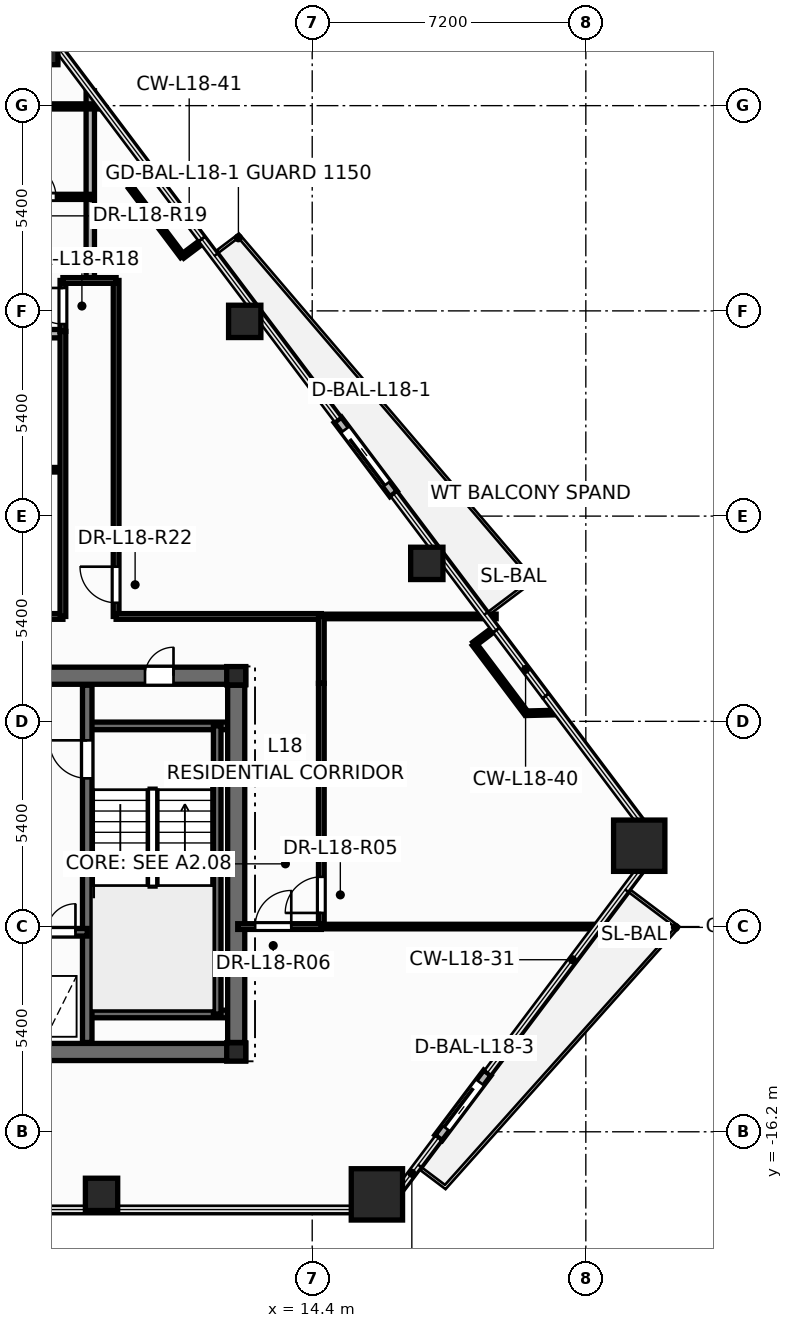
"""IFC4 building model, lengths in metres.
Left out: names, types, materials, properties, quantities, classifications, styles, units other than length and angle.
Written with IfcOpenShell. Run it as: python <this file> out.ifc"""

import sys

from ifc_helpers import new_model, si_unit, direction, frame, frame_2d, origin, origin_2d, place, context, subcontext, project, spatial, rectangle, hollow_rectangle, hollow_circle, i_section, extrude, element, fill, save


model = new_model("IFC4")
c1 = context("Model", 3, precision=1e-05, world=origin(), true_north=direction((0.0, 1.0)))
c2 = subcontext(c1, "Body", "Model", "MODEL_VIEW")
j1 = project(units=[si_unit("LENGTHUNIT", "METRE"), si_unit("PLANEANGLEUNIT", "RADIAN")], contexts=[c1])
p1 = place(None, origin())
s1 = spatial("IfcSite", under=j1, at=p1, CompositionType="ELEMENT")
p2 = place(p1, origin())
s2 = spatial("IfcBuilding", under=s1, at=p2, CompositionType="ELEMENT")
p3 = place(p2, frame((0.0, 0.0, 72.0)))
s3 = spatial("IfcBuildingStorey", under=s2, at=p3, CompositionType="ELEMENT", Elevation=72.0)
for number, where, z_axis, x_axis in (
    (1, (16.103, -17.847, 0.0), (0.0, 0.0, 1.0), (1.0, 0.0, 0.0)),
    (2, (23.005, -8.673, 0.0), (0.0, 0.0, 1.0), (1.0, 0.0, 0.0)),
    (3, (7.034, 12.553, 0.0), (0.0, 0.0, 1.0), (1.0, 0.0, 0.0)),
):
    element("IfcColumn", number, at=place(p3, frame(where, z_axis=z_axis, x_axis=x_axis)), inside=s3, PredefinedType="COLUMN", context=c2, shape_type="SweptSolid", body=[
        extrude(hollow_rectangle(XDim=1.35, YDim=1.35, WallThickness=0.065, at=origin_2d()), origin(), (0.0, 0.0, 1.0), 3.6),
    ])
for number, where, z_axis, x_axis in (
    (4, (8.856, -17.847, 0.0), (0.0, 0.0, 1.0), (1.0, 0.0, 0.0)),
    (5, (17.416, -1.244, 0.0), (0.0, 0.0, 1.0), (1.0, 0.0, 0.0)),
    (6, (12.624, 5.124, 0.0), (0.0, 0.0, 1.0), (1.0, 0.0, 0.0)),
):
    element("IfcColumn", number, at=place(p3, frame(where, z_axis=z_axis, x_axis=x_axis)), inside=s3, PredefinedType="COLUMN", context=c2, shape_type="SweptSolid", body=[
        extrude(hollow_circle(Radius=0.425, WallThickness=0.038, at=origin_2d()), origin(), (0.0, 0.0, 1.0), 3.6),
    ])
for number, where, z_axis, x_axis in (
    (7, (12.4, -14.1, 0.0), (0.0, 0.0, 1.0), (1.0, 0.0, 0.0)),
    (8, (12.4, -4.2, 0.0), (0.0, 0.0, 1.0), (1.0, 0.0, 0.0)),
):
    element("IfcColumn", number, at=place(p3, frame(where, z_axis=z_axis, x_axis=x_axis)), inside=s3, PredefinedType="COLUMN", context=c2, shape_type="SweptSolid", body=[
        extrude(i_section(OverallWidth=0.5, OverallDepth=0.482, WebThickness=0.04, FlangeThickness=0.045, at=origin_2d()), origin(), (0.0, 0.0, 1.0), 3.6),
    ])
p4 = place(p3, frame((16.542, 0.583, -0.015), z_axis=(0.0, 0.0, 1.0), x_axis=(-0.601247991813, 0.799062483377, 0.0)))
e9 = element("IfcWall", 9, at=p4, inside=s3, PredefinedType="STANDARD", context=c2, shape_type="SweptSolid", body=[
    extrude(rectangle(XDim=2.44, YDim=0.24, at=frame_2d((1.22, 0.0))), origin(), (0.0, 0.0, 1.0), 2.728),
])
p5 = place(p4, frame((0.32, 0.0, 0.015)))
e10 = element("IfcOpeningElement", 10, at=p5, cuts=e9, PredefinedType="OPENING", context=c2, shape_type="SweptSolid", body=[
    extrude(rectangle(XDim=1.806, YDim=2.204, at=frame_2d((0.9, 1.102))), frame((0.0, 0.13, 0.0), z_axis=(0.0, -1.0, 0.0), x_axis=(1.0, 0.0, 0.0)), (0.0, 0.0, 1.0), 0.26),
])
p6 = place(p3, frame((17.723, -16.358, -0.015), z_axis=(0.0, 0.0, 1.0), x_axis=(0.601240548581, 0.799068083921, 0.0)))
e11 = element("IfcWall", 11, at=p6, inside=s3, PredefinedType="STANDARD", context=c2, shape_type="SweptSolid", body=[
    extrude(rectangle(XDim=2.14, YDim=0.24, at=frame_2d((1.07, 0.0))), origin(), (0.0, 0.0, 1.0), 2.728),
])
p7 = place(p6, frame((0.32, 0.0, 0.015)))
e12 = element("IfcOpeningElement", 12, at=p7, cuts=e11, PredefinedType="OPENING", context=c2, shape_type="SweptSolid", body=[
    extrude(rectangle(XDim=1.506, YDim=2.204, at=frame_2d((0.75, 1.102))), frame((0.0, 0.13, 0.0), z_axis=(0.0, -1.0, 0.0), x_axis=(1.0, 0.0, 0.0)), (0.0, 0.0, 1.0), 0.26),
])
p8 = place(p3, frame((-12.65, -14.1, 0.0), z_axis=(0.0, 0.0, 1.0), x_axis=(1.0, 0.0, 0.0)))
e13 = element("IfcWall", 13, at=p8, inside=s3, PredefinedType="SHEAR", context=c2, shape_type="SweptSolid", body=[
    extrude(rectangle(XDim=25.3, YDim=0.45, at=frame_2d((12.65, 0.0))), origin(), (0.0, 0.0, 1.0), 3.6),
])
p9 = place(p3, frame((-12.65, -4.2, 0.0), z_axis=(0.0, 0.0, 1.0), x_axis=(1.0, 0.0, 0.0)))
e14 = element("IfcWall", 14, at=p9, inside=s3, PredefinedType="SHEAR", context=c2, shape_type="SweptSolid", body=[
    extrude(rectangle(XDim=25.3, YDim=0.45, at=frame_2d((12.65, 0.0))), origin(), (0.0, 0.0, 1.0), 3.6),
])
p10 = place(p9, frame((1.85, 0.0, 0.0)))
e15 = element("IfcOpeningElement", 15, at=p10, cuts=e14, PredefinedType="OPENING", context=c2, shape_type="SweptSolid", body=[
    extrude(rectangle(XDim=0.756, YDim=2.054, at=frame_2d((0.375, 1.027))), frame((0.0, 0.235, 0.0), z_axis=(0.0, -1.0, 0.0), x_axis=(1.0, 0.0, 0.0)), (0.0, 0.0, 1.0), 0.47),
])
p11 = place(p9, frame((22.65, 0.0, 0.0)))
e16 = element("IfcOpeningElement", 16, at=p11, cuts=e14, PredefinedType="OPENING", context=c2, shape_type="SweptSolid", body=[
    extrude(rectangle(XDim=0.756, YDim=2.054, at=frame_2d((0.375, 1.027))), frame((0.0, 0.235, 0.0), z_axis=(0.0, -1.0, 0.0), x_axis=(1.0, 0.0, 0.0)), (0.0, 0.0, 1.0), 0.47),
])
p12 = place(p9, frame((5.85, 0.0, 0.0)))
e17 = element("IfcOpeningElement", 17, at=p12, cuts=e14, PredefinedType="OPENING", context=c2, shape_type="SweptSolid", body=[
    extrude(rectangle(XDim=1.006, YDim=2.104, at=frame_2d((0.5, 1.052))), frame((0.0, 0.235, 0.0), z_axis=(0.0, -1.0, 0.0), x_axis=(1.0, 0.0, 0.0)), (0.0, 0.0, 1.0), 0.47),
])
p13 = place(p9, frame((10.35, 0.0, 0.0)))
e18 = element("IfcOpeningElement", 18, at=p13, cuts=e14, PredefinedType="OPENING", context=c2, shape_type="SweptSolid", body=[
    extrude(rectangle(XDim=1.406, YDim=2.154, at=frame_2d((0.7, 1.077))), frame((0.0, 0.235, 0.0), z_axis=(0.0, -1.0, 0.0), x_axis=(1.0, 0.0, 0.0)), (0.0, 0.0, 1.0), 0.47),
])
p14 = place(p9, frame((18.45, 0.0, 0.0)))
e19 = element("IfcOpeningElement", 19, at=p14, cuts=e14, PredefinedType="OPENING", context=c2, shape_type="SweptSolid", body=[
    extrude(rectangle(XDim=1.006, YDim=2.104, at=frame_2d((0.5, 1.052))), frame((0.0, 0.235, 0.0), z_axis=(0.0, -1.0, 0.0), x_axis=(1.0, 0.0, 0.0)), (0.0, 0.0, 1.0), 0.47),
])
for number, where, z_axis, x_axis in (
    (20, (8.48, -5.52, 0.0), (0.0, 0.0, 1.0), (1.0, 0.0, 0.0)),
    (21, (8.48, -13.1, 0.0), (0.0, 0.0, 1.0), (1.0, 0.0, 0.0)),
):
    element("IfcWall", number, at=place(p3, frame(where, z_axis=z_axis, x_axis=x_axis)), inside=s3, PredefinedType="SOLIDWALL", context=c2, shape_type="SweptSolid", body=[
        extrude(rectangle(XDim=3.87, YDim=0.2, at=frame_2d((1.935, 0.0))), origin(), (0.0, 0.0, 1.0), 3.6),
    ])
p15 = place(p3, frame((11.9, -13.1, 0.0), z_axis=(0.0, 0.0, 1.0), x_axis=(0.0, 1.0, 0.0)))
e22 = element("IfcWall", 22, at=p15, inside=s3, PredefinedType="SOLIDWALL", context=c2, shape_type="SweptSolid", body=[
    extrude(rectangle(XDim=7.58, YDim=0.2, at=frame_2d((3.79, 0.0))), origin(), (0.0, 0.0, 1.0), 3.6),
])
p16 = place(p3, frame((8.48, -13.85, 0.0), z_axis=(0.0, 0.0, 1.0), x_axis=(0.0, 1.0, 0.0)))
e23 = element("IfcWall", 23, at=p16, inside=s3, PredefinedType="SHEAR", context=c2, shape_type="SweptSolid", body=[
    extrude(rectangle(XDim=9.4, YDim=0.25, at=frame_2d((4.7, 0.0))), origin(), (0.0, 0.0, 1.0), 3.6),
])
p17 = place(p16, frame((6.95, 0.0, 0.0)))
e24 = element("IfcOpeningElement", 24, at=p17, cuts=e23, PredefinedType="OPENING", context=c2, shape_type="SweptSolid", body=[
    extrude(rectangle(XDim=1.006, YDim=2.104, at=frame_2d((0.5, 1.052))), frame((0.0, 0.135, 0.0), z_axis=(0.0, -1.0, 0.0), x_axis=(1.0, 0.0, 0.0)), (0.0, 0.0, 1.0), 0.27),
])
p18 = place(p3, frame((5.12, -10.95, 0.0), z_axis=(0.0, 0.0, 1.0), x_axis=(1.0, 0.0, 0.0)))
e25 = element("IfcWall", 25, at=p18, inside=s3, PredefinedType="SOLIDWALL", context=c2, shape_type="SweptSolid", body=[
    extrude(rectangle(XDim=3.36, YDim=0.2, at=frame_2d((1.68, 0.0))), origin(), (0.0, 0.0, 1.0), 3.6),
])
p19 = place(p18, frame((0.42, 0.0, 0.0)))
e26 = element("IfcOpeningElement", 26, at=p19, cuts=e25, PredefinedType="OPENING", context=c2, shape_type="SweptSolid", body=[
    extrude(rectangle(XDim=1.106, YDim=2.104, at=frame_2d((0.55, 1.052))), frame((0.0, 0.11, 0.0), z_axis=(0.0, -1.0, 0.0), x_axis=(1.0, 0.0, 0.0)), (0.0, 0.0, 1.0), 0.22),
])
p20 = place(p18, frame((2.3, 0.0, 0.0)))
e27 = element("IfcOpeningElement", 27, at=p20, cuts=e25, PredefinedType="OPENING", context=c2, shape_type="SweptSolid", body=[
    extrude(rectangle(XDim=0.756, YDim=2.054, at=frame_2d((0.375, 1.027))), frame((0.0, 0.11, 0.0), z_axis=(0.0, -1.0, 0.0), x_axis=(1.0, 0.0, 0.0)), (0.0, 0.0, 1.0), 0.22),
])
p21 = place(p3, frame((12.4, -13.85, 0.0), z_axis=(0.0, 0.0, 1.0), x_axis=(0.0, 1.0, 0.0)))
e28 = element("IfcWall", 28, at=p21, inside=s3, PredefinedType="SHEAR", context=c2, shape_type="SweptSolid", body=[
    extrude(rectangle(XDim=9.4, YDim=0.45, at=frame_2d((4.7, 0.0))), origin(), (0.0, 0.0, 1.0), 3.6),
])
p22 = place(p3, frame((-5.32, -2.64, 0.0), z_axis=(0.0, 0.0, 1.0), x_axis=(1.0, 0.0, 0.0)))
e29 = element("IfcWall", 29, at=p22, inside=s3, PredefinedType="PARTITIONING", context=c2, shape_type="SweptSolid", body=[
    extrude(rectangle(XDim=13.16, YDim=0.15, at=frame_2d((6.58, 0.0))), origin(), (0.0, 0.0, 1.0), 2.325),
])
p23 = place(p22, frame((0.439, 0.0, 0.0)))
e30 = element("IfcOpeningElement", 30, at=p23, cuts=e29, PredefinedType="OPENING", context=c2, shape_type="SweptSolid", body=[
    extrude(rectangle(XDim=0.956, YDim=2.104, at=frame_2d((0.475, 1.052))), frame((0.0, 0.085, 0.0), z_axis=(0.0, -1.0, 0.0), x_axis=(1.0, 0.0, 0.0)), (0.0, 0.0, 1.0), 0.17),
])
p24 = place(p3, frame((9.24, -2.64, 0.0), z_axis=(0.0, 0.0, 1.0), x_axis=(0.0, 1.0, 0.0)))
e31 = element("IfcWall", 31, at=p24, inside=s3, PredefinedType="PARTITIONING", context=c2, shape_type="SweptSolid", body=[
    extrude(rectangle(XDim=8.84, YDim=0.15, at=frame_2d((4.42, 0.0))), origin(), (0.0, 0.0, 1.0), 2.509),
])
p25 = place(p24, frame((0.359, 0.0, 0.0)))
e32 = element("IfcOpeningElement", 32, at=p25, cuts=e31, PredefinedType="OPENING", context=c2, shape_type="SweptSolid", body=[
    extrude(rectangle(XDim=0.956, YDim=2.104, at=frame_2d((0.475, 1.052))), frame((0.0, 0.085, 0.0), z_axis=(0.0, -1.0, 0.0), x_axis=(1.0, 0.0, 0.0)), (0.0, 0.0, 1.0), 0.17),
])
p26 = place(p3, frame((14.64, -10.8, 0.0), z_axis=(0.0, 0.0, 1.0), x_axis=(1.0, 0.0, 0.0)))
e33 = element("IfcWall", 33, at=p26, inside=s3, PredefinedType="PARTITIONING", context=c2, shape_type="SweptSolid", body=[
    extrude(rectangle(XDim=7.265, YDim=0.12, at=frame_2d((3.633, 0.0))), origin(), (0.0, 0.0, 1.0), 2.713),
])
p27 = place(p3, frame((0.84, 1.22, 0.0), z_axis=(0.0, 0.0, 1.0), x_axis=(1.0, 0.0, 0.0)))
e34 = element("IfcWall", 34, at=p27, inside=s3, PredefinedType="PARTITIONING", context=c2, shape_type="SweptSolid", body=[
    extrude(rectangle(XDim=7.0, YDim=0.12, at=frame_2d((3.5, 0.0))), origin(), (0.0, 0.0, 1.0), 2.325),
])
p28 = place(p27, frame((0.875, 0.0, 0.0)))
e35 = element("IfcOpeningElement", 35, at=p28, cuts=e34, PredefinedType="OPENING", context=c2, shape_type="SweptSolid", body=[
    extrude(rectangle(XDim=0.926, YDim=2.104, at=frame_2d((0.46, 1.052))), frame((0.0, 0.07, 0.0), z_axis=(0.0, -1.0, 0.0), x_axis=(1.0, 0.0, 0.0)), (0.0, 0.0, 1.0), 0.14),
])
p29 = place(p3, frame((0.9, 4.8, 0.0), z_axis=(0.0, 0.0, 1.0), x_axis=(1.0, 0.0, 0.0)))
e36 = element("IfcWall", 36, at=p29, inside=s3, PredefinedType="PARTITIONING", context=c2, shape_type="SweptSolid", body=[
    extrude(rectangle(XDim=6.94, YDim=0.22, at=frame_2d((3.47, 0.0))), origin(), (0.0, 0.0, 1.0), 2.509),
])
p30 = place(p3, frame((14.64, -10.8, 0.0), z_axis=(0.0, 0.0, 1.0), x_axis=(0.0, 1.0, 0.0)))
e37 = element("IfcWall", 37, at=p30, inside=s3, PredefinedType="PARTITIONING", context=c2, shape_type="SweptSolid", body=[
    extrude(rectangle(XDim=6.4, YDim=0.15, at=frame_2d((3.2, 0.0))), origin(), (0.0, 0.0, 1.0), 2.325),
])
p31 = place(p30, frame((0.359, 0.0, 0.0)))
e38 = element("IfcOpeningElement", 38, at=p31, cuts=e37, PredefinedType="OPENING", context=c2, shape_type="SweptSolid", body=[
    extrude(rectangle(XDim=0.956, YDim=2.104, at=frame_2d((0.475, 1.052))), frame((0.0, 0.085, 0.0), z_axis=(0.0, -1.0, 0.0), x_axis=(1.0, 0.0, 0.0)), (0.0, 0.0, 1.0), 0.17),
])
p32 = place(p3, frame((9.24, -2.64, 0.0), z_axis=(0.0, 0.0, 1.0), x_axis=(1.0, 0.0, 0.0)))
e39 = element("IfcWall", 39, at=p32, inside=s3, PredefinedType="PARTITIONING", context=c2, shape_type="SweptSolid", body=[
    extrude(rectangle(XDim=5.4, YDim=0.15, at=frame_2d((2.7, 0.0))), origin(), (0.0, 0.0, 1.0), 3.35),
])
p33 = place(p3, frame((14.64, -2.64, 0.0), z_axis=(0.0, 0.0, 1.0), x_axis=(1.0, 0.0, 0.0)))
e40 = element("IfcWall", 40, at=p33, inside=s3, PredefinedType="PARTITIONING", context=c2, shape_type="SweptSolid", body=[
    extrude(rectangle(XDim=4.6, YDim=0.12, at=frame_2d((2.3, 0.0))), origin(), (0.0, 0.0, 1.0), 2.713),
])
p34 = place(p3, frame((7.84, -2.64, 0.0), z_axis=(0.0, 0.0, 1.0), x_axis=(0.0, 1.0, 0.0)))
e41 = element("IfcWall", 41, at=p34, inside=s3, PredefinedType="PARTITIONING", context=c2, shape_type="SweptSolid", body=[
    extrude(rectangle(XDim=7.5, YDim=0.15, at=frame_2d((3.75, 0.0))), origin(), (0.0, 0.0, 1.0), 2.509),
])
p35 = place(p3, frame((8.56, 6.2, 0.0), z_axis=(0.0, 0.0, 1.0), x_axis=(0.0, 1.0, 0.0)))
e42 = element("IfcWall", 42, at=p35, inside=s3, PredefinedType="PARTITIONING", context=c2, shape_type="SweptSolid", body=[
    extrude(rectangle(XDim=4.991, YDim=0.22, at=frame_2d((2.495, 0.0))), origin(), (0.0, 0.0, 1.0), 2.509),
])
p36 = place(p3, frame((6.2, 10.78, 0.0), z_axis=(0.0, 0.0, 1.0), x_axis=(1.0, 0.0, 0.0)))
e43 = element("IfcWall", 43, at=p36, inside=s3, PredefinedType="PARTITIONING", context=c2, shape_type="SweptSolid", body=[
    extrude(rectangle(XDim=2.669, YDim=0.135, at=frame_2d((1.334, 0.0))), origin(), (0.0, 0.0, 1.0), 2.509),
])
p37 = place(p3, frame((6.262, 8.4, 0.0), z_axis=(0.0, 0.0, 1.0), x_axis=(1.0, 0.0, 0.0)))
e44 = element("IfcWall", 44, at=p37, inside=s3, PredefinedType="PARTITIONING", context=c2, shape_type="SweptSolid", body=[
    extrude(rectangle(XDim=2.298, YDim=0.135, at=frame_2d((1.149, 0.0))), origin(), (0.0, 0.0, 1.0), 3.35),
])
p38 = place(p37, frame((0.546, 0.0, 0.0)))
e45 = element("IfcOpeningElement", 45, at=p38, cuts=e44, PredefinedType="OPENING", context=c2, shape_type="SweptSolid", body=[
    extrude(rectangle(XDim=0.856, YDim=2.104, at=frame_2d((0.425, 1.052))), frame((0.0, 0.078, 0.0), z_axis=(0.0, -1.0, 0.0), x_axis=(1.0, 0.0, 0.0)), (0.0, 0.0, 1.0), 0.155),
])
for number, where, z_axis, x_axis in (
    (46, (10.986, 6.836, 0.0), (0.0, 0.0, 1.0), (-0.601, 0.799, 0.0)),
    (47, (20.032, -5.187, 0.0), (0.0, 0.0, 1.0), (-0.601, 0.799, 0.0)),
):
    element("IfcWall", number, at=place(p3, frame(where, z_axis=z_axis, x_axis=x_axis)), inside=s3, PredefinedType="PARTITIONING", context=c2, shape_type="SweptSolid", body=[
        extrude(rectangle(XDim=2.279, YDim=0.12, at=frame_2d((1.14, 0.0))), origin(), (0.0, 0.0, 1.0), 3.35),
    ])
p39 = place(p3, frame((12.44, -10.8, 0.0), z_axis=(0.0, 0.0, 1.0), x_axis=(1.0, 0.0, 0.0)))
e48 = element("IfcWall", 48, at=p39, inside=s3, PredefinedType="PARTITIONING", context=c2, shape_type="SweptSolid", body=[
    extrude(rectangle(XDim=2.2, YDim=0.15, at=frame_2d((1.1, 0.0))), origin(), (0.0, 0.0, 1.0), 2.713),
])
p40 = place(p39, frame((0.459, 0.0, 0.0)))
e49 = element("IfcOpeningElement", 49, at=p40, cuts=e48, PredefinedType="OPENING", context=c2, shape_type="SweptSolid", body=[
    extrude(rectangle(XDim=0.956, YDim=2.104, at=frame_2d((0.475, 1.052))), frame((0.0, 0.085, 0.0), z_axis=(0.0, -1.0, 0.0), x_axis=(1.0, 0.0, 0.0)), (0.0, 0.0, 1.0), 0.17),
])
p41 = place(p3, frame((14.64, -4.4, 0.0), z_axis=(0.0, 0.0, 1.0), x_axis=(0.0, 1.0, 0.0)))
e50 = element("IfcWall", 50, at=p41, inside=s3, PredefinedType="PARTITIONING", context=c2, shape_type="SweptSolid", body=[
    extrude(rectangle(XDim=1.76, YDim=0.15, at=frame_2d((0.88, 0.0))), origin(), (0.0, 0.0, 1.0), 3.35),
])
p42 = place(p3, frame((7.84, 4.862, 0.0), z_axis=(0.0, 0.0, 1.0), x_axis=(0.0, 1.0, 0.0)))
e51 = element("IfcWall", 51, at=p42, inside=s3, PredefinedType="PARTITIONING", context=c2, shape_type="SweptSolid", body=[
    extrude(rectangle(XDim=1.338, YDim=0.15, at=frame_2d((0.669, 0.0))), origin(), (0.0, 0.0, 1.0), 3.35),
])
p43 = place(p42, frame((0.191, 0.0, 0.0)))
e52 = element("IfcOpeningElement", 52, at=p43, cuts=e51, PredefinedType="OPENING", context=c2, shape_type="SweptSolid", body=[
    extrude(rectangle(XDim=0.956, YDim=2.104, at=frame_2d((0.475, 1.052))), frame((0.0, 0.085, 0.0), z_axis=(0.0, -1.0, 0.0), x_axis=(1.0, 0.0, 0.0)), (0.0, 0.0, 1.0), 0.17),
])
p44 = place(p3, frame((20.856, -5.168, 0.0), z_axis=(0.0, 0.0, 1.0), x_axis=(-0.999739997708, -0.022802126725, 0.0)))
e53 = element("IfcWall", 53, at=p44, inside=s3, PredefinedType="PARTITIONING", context=c2, shape_type="SweptSolid", body=[
    extrude(rectangle(XDim=0.824, YDim=0.12, at=frame_2d((0.412, 0.0))), origin(), (0.0, 0.0, 1.0), 2.713),
])
p45 = place(p3, frame((7.84, 6.2, 0.0), z_axis=(0.0, 0.0, 1.0), x_axis=(1.0, 0.0, 0.0)))
e54 = element("IfcWall", 54, at=p45, inside=s3, PredefinedType="PARTITIONING", context=c2, shape_type="SweptSolid", body=[
    extrude(rectangle(XDim=1.4, YDim=0.15, at=frame_2d((0.7, 0.0))), origin(), (0.0, 0.0, 1.0), 3.35),
])
p46 = place(p3, frame((9.615, 8.657, 0.0), z_axis=(0.0, 0.0, 1.0), x_axis=(0.613137094739, 0.789976520572, 0.0)))
e55 = element("IfcWall", 55, at=p46, inside=s3, PredefinedType="PARTITIONING", context=c2, shape_type="SweptSolid", body=[
    extrude(rectangle(XDim=0.694, YDim=0.12, at=frame_2d((0.347, 0.0))), origin(), (0.0, 0.0, 1.0), 2.713),
])
for number, where, z_axis, x_axis in (
    (56, (18.662, -3.366, 0.0), (0.0, 0.0, 1.0), (0.799, 0.601, 0.0)),
    (57, (11.521, 7.239, 0.0), (0.0, 0.0, 1.0), (-0.799, -0.601, 0.0)),
):
    element("IfcWall", number, at=place(p3, frame(where, z_axis=z_axis, x_axis=x_axis)), inside=s3, PredefinedType="PARTITIONING", context=c2, shape_type="SweptSolid", body=[
        extrude(rectangle(XDim=0.67, YDim=0.12, at=frame_2d((0.335, 0.0))), origin(), (0.0, 0.0, 1.0), 2.713),
    ])
p47 = place(p5, origin())
e58 = element("IfcDoor", 58, at=p47, inside=s3, OperationType="SLIDING_TO_LEFT", PredefinedType="DOOR", context=c2, shape_type="SweptSolid", body=[
    extrude(rectangle(XDim=1.8, YDim=2.2, at=frame_2d((0.9, 1.1))), frame((0.0, 0.025, 0.0), z_axis=(0.0, -1.0, 0.0), x_axis=(1.0, 0.0, 0.0)), (0.0, 0.0, 1.0), 0.05),
])
fill(e10, e58)
p48 = place(p7, origin())
e59 = element("IfcDoor", 59, at=p48, inside=s3, OperationType="SLIDING_TO_RIGHT", PredefinedType="DOOR", context=c2, shape_type="SweptSolid", body=[
    extrude(rectangle(XDim=1.5, YDim=2.2, at=frame_2d((0.75, 1.1))), frame((0.0, 0.025, 0.0), z_axis=(0.0, -1.0, 0.0), x_axis=(1.0, 0.0, 0.0)), (0.0, 0.0, 1.0), 0.05),
])
fill(e12, e59)
p49 = place(p17, origin())
e60 = element("IfcDoor", 60, at=p49, inside=s3, OperationType="SINGLE_SWING_RIGHT", PredefinedType="DOOR", context=c2, shape_type="SweptSolid", body=[
    extrude(rectangle(XDim=1.0, YDim=2.1, at=frame_2d((0.5, 1.05))), frame((0.0, 0.025, 0.0), z_axis=(0.0, -1.0, 0.0), x_axis=(1.0, 0.0, 0.0)), (0.0, 0.0, 1.0), 0.05),
])
fill(e24, e60)
p50 = place(p20, origin())
e61 = element("IfcDoor", 61, at=p50, inside=s3, OperationType="SINGLE_SWING_RIGHT", PredefinedType="DOOR", context=c2, shape_type="SweptSolid", body=[
    extrude(rectangle(XDim=0.75, YDim=2.05, at=frame_2d((0.375, 1.025))), frame((0.0, 0.025, 0.0), z_axis=(0.0, -1.0, 0.0), x_axis=(1.0, 0.0, 0.0)), (0.0, 0.0, 1.0), 0.05),
])
fill(e27, e61)
p51 = place(p11, origin())
e62 = element("IfcDoor", 62, at=p51, inside=s3, OperationType="SINGLE_SWING_RIGHT", PredefinedType="DOOR", context=c2, shape_type="SweptSolid", body=[
    extrude(rectangle(XDim=0.75, YDim=2.05, at=frame_2d((0.375, 1.025))), frame((0.0, 0.025, 0.0), z_axis=(0.0, -1.0, 0.0), x_axis=(1.0, 0.0, 0.0)), (0.0, 0.0, 1.0), 0.05),
])
fill(e16, e62)
p52 = place(p31, origin())
e63 = element("IfcDoor", 63, at=p52, inside=s3, OperationType="SINGLE_SWING_LEFT", PredefinedType="DOOR", context=c2, shape_type="SweptSolid", body=[
    extrude(rectangle(XDim=0.95, YDim=2.1, at=frame_2d((0.475, 1.05))), frame((0.0, 0.025, 0.0), z_axis=(0.0, -1.0, 0.0), x_axis=(1.0, 0.0, 0.0)), (0.0, 0.0, 1.0), 0.05),
])
fill(e38, e63)
p53 = place(p40, origin())
e64 = element("IfcDoor", 64, at=p53, inside=s3, OperationType="SINGLE_SWING_RIGHT", PredefinedType="DOOR", context=c2, shape_type="SweptSolid", body=[
    extrude(rectangle(XDim=0.95, YDim=2.1, at=frame_2d((0.475, 1.05))), frame((0.0, 0.025, 0.0), z_axis=(0.0, -1.0, 0.0), x_axis=(1.0, 0.0, 0.0)), (0.0, 0.0, 1.0), 0.05),
])
fill(e49, e64)
p54 = place(p43, origin())
e65 = element("IfcDoor", 65, at=p54, inside=s3, OperationType="SINGLE_SWING_RIGHT", PredefinedType="DOOR", context=c2, shape_type="SweptSolid", body=[
    extrude(rectangle(XDim=0.95, YDim=2.1, at=frame_2d((0.475, 1.05))), frame((0.0, 0.025, 0.0), z_axis=(0.0, -1.0, 0.0), x_axis=(1.0, 0.0, 0.0)), (0.0, 0.0, 1.0), 0.05),
])
fill(e52, e65)
p55 = place(p38, origin())
e66 = element("IfcDoor", 66, at=p55, inside=s3, OperationType="SINGLE_SWING_LEFT", PredefinedType="DOOR", context=c2, shape_type="SweptSolid", body=[
    extrude(rectangle(XDim=0.85, YDim=2.1, at=frame_2d((0.425, 1.05))), frame((0.0, 0.025, 0.0), z_axis=(0.0, -1.0, 0.0), x_axis=(1.0, 0.0, 0.0)), (0.0, 0.0, 1.0), 0.05),
])
fill(e45, e66)
p56 = place(p25, origin())
e67 = element("IfcDoor", 67, at=p56, inside=s3, OperationType="SINGLE_SWING_RIGHT", PredefinedType="DOOR", context=c2, shape_type="SweptSolid", body=[
    extrude(rectangle(XDim=0.95, YDim=2.1, at=frame_2d((0.475, 1.05))), frame((0.0, 0.025, 0.0), z_axis=(0.0, -1.0, 0.0), x_axis=(1.0, 0.0, 0.0)), (0.0, 0.0, 1.0), 0.05),
])
fill(e32, e67)
save(model, sys.argv[1])
